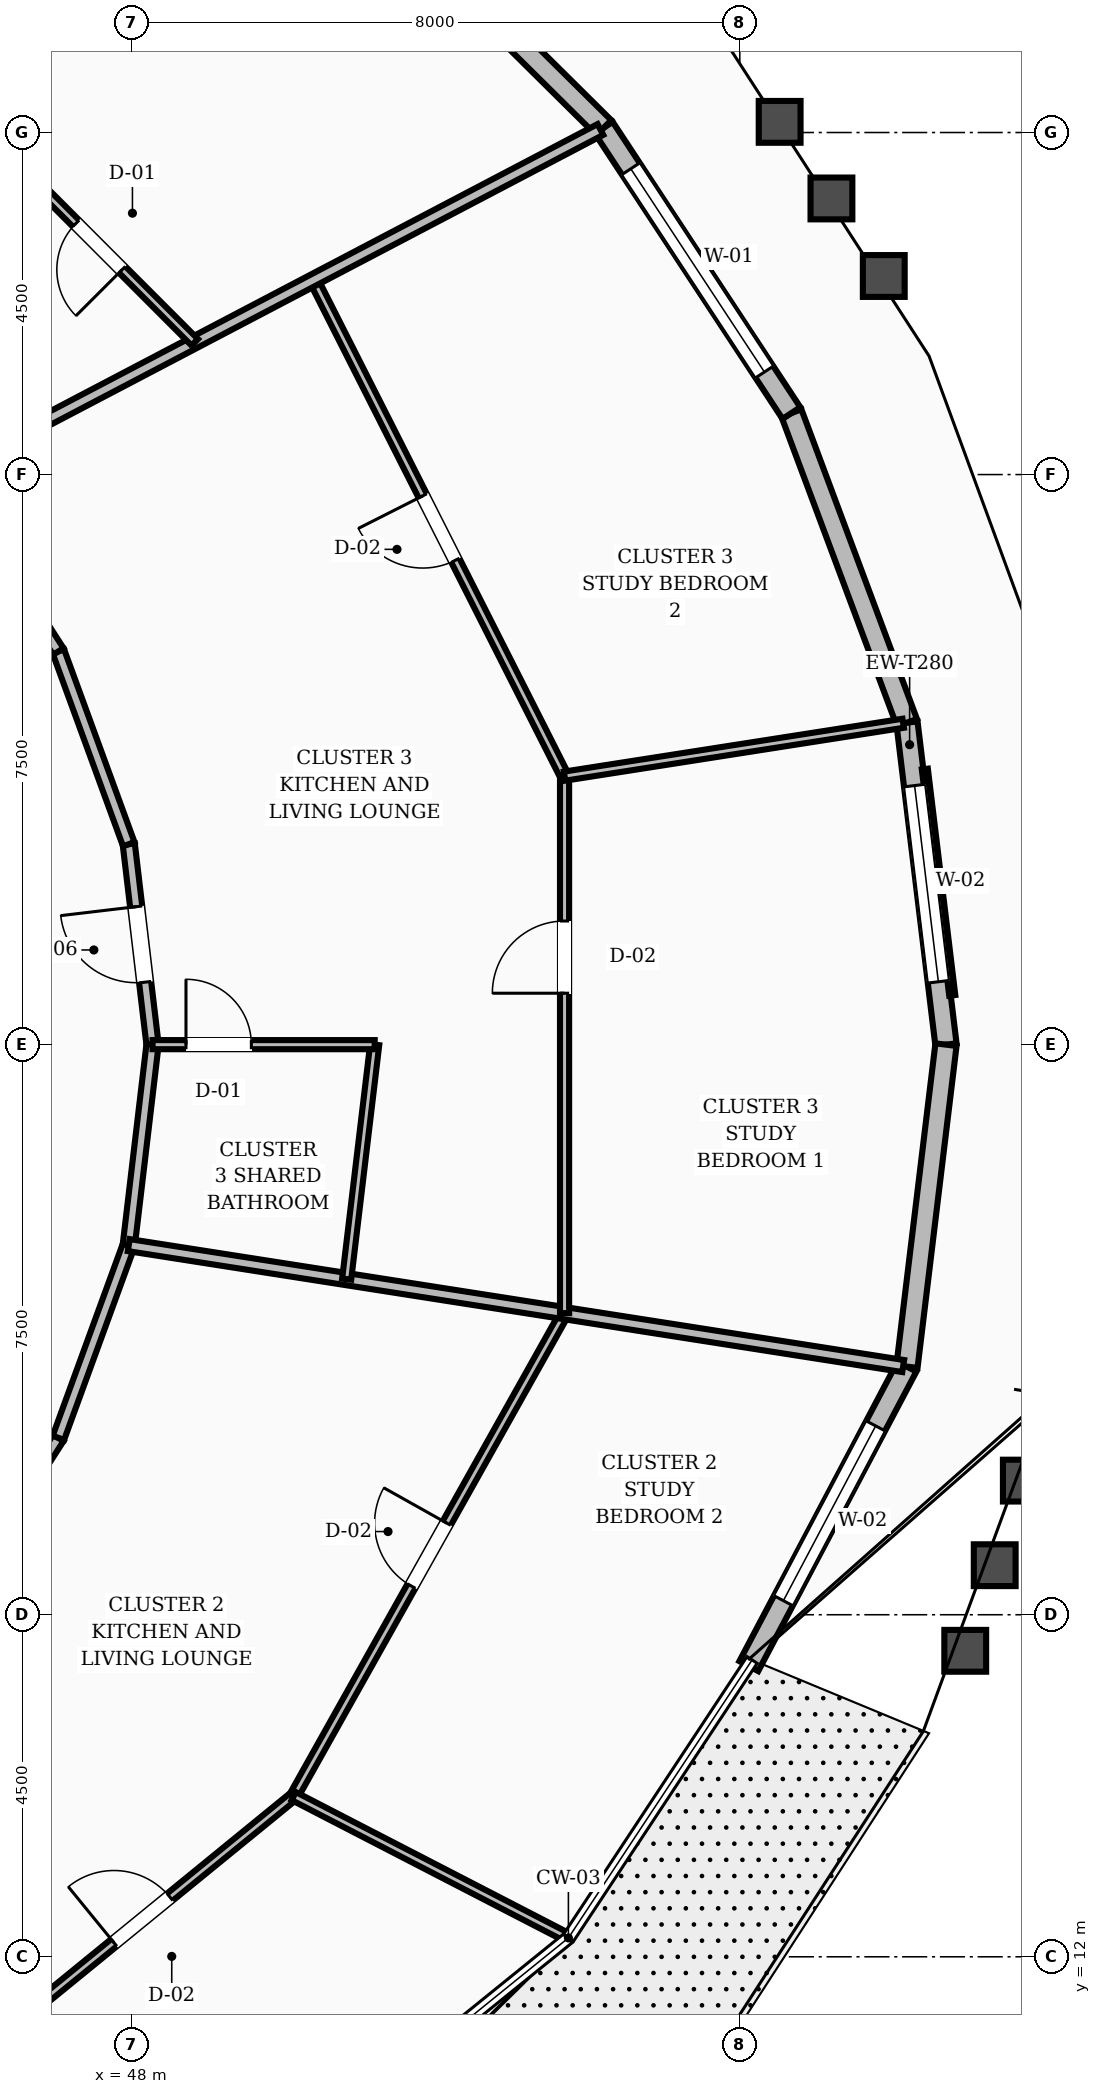
"""IFC4 building model, lengths in metres.
Left out: names, types, materials, properties, quantities, classifications, styles, units other than length and angle.
Written with IfcOpenShell. Run it as: python <this file> out.ifc"""

import sys

from ifc_helpers import new_model, si_unit, direction, frame, frame_2d, origin, place, context, subcontext, project, spatial, rectangle, extrude, element, fill, save


model = new_model("IFC4")
c1 = context("Model", 3, precision=1e-05, world=origin(), true_north=direction((0.0, 1.0)))
c2 = subcontext(c1, "Body", "Model", "MODEL_VIEW")
j1 = project(units=[si_unit("LENGTHUNIT", "METRE"), si_unit("PLANEANGLEUNIT", "RADIAN")], contexts=[c1])
p1 = place(None, origin())
s1 = spatial("IfcSite", under=j1, at=p1, CompositionType="ELEMENT")
p2 = place(p1, origin())
s2 = spatial("IfcBuilding", under=s1, at=p2, CompositionType="ELEMENT")
p3 = place(p2, frame((0.0, 0.0, 59.2)))
s3 = spatial("IfcBuildingStorey", under=s2, at=p3, CompositionType="ELEMENT", Elevation=59.2)
p4 = place(p3, frame((58.713, 24.0, 0.0), z_axis=(0.0, 0.0, 1.0), x_axis=(-0.120273268537, 0.992740822609, 0.0)))
e1 = element("IfcWall", 1, at=p4, inside=s3, PredefinedType="STANDARD", context=c2, shape_type="SweptSolid", body=[
    extrude(rectangle(XDim=4.267, YDim=0.28, at=frame_2d((2.133, 0.0))), origin(), (0.0, 0.0, 1.0), 2.65),
])
p5 = place(p4, frame((0.833, 0.0, 0.8)))
e2 = element("IfcOpeningElement", 2, at=p5, cuts=e1, PredefinedType="OPENING", context=c2, shape_type="SweptSolid", body=[
    extrude(rectangle(XDim=2.6, YDim=1.65, at=frame_2d((1.3, 0.825))), frame((0.0, 0.15, 0.0), z_axis=(0.0, -1.0, 0.0), x_axis=(1.0, 0.0, 0.0)), (0.0, 0.0, 1.0), 0.3),
])
p6 = place(p3, frame((58.199, 28.236, 0.0), z_axis=(0.0, 0.0, 1.0), x_axis=(-0.349670708584, 0.93687266774, 0.0)))
e3 = element("IfcWall", 3, at=p6, inside=s3, PredefinedType="STANDARD", context=c2, shape_type="SweptSolid", body=[
    extrude(rectangle(XDim=4.348, YDim=0.28, at=frame_2d((2.174, 0.0))), origin(), (0.0, 0.0, 1.0), 2.65),
])
p7 = place(p3, frame((56.679, 32.309, 0.0), z_axis=(0.0, 0.0, 1.0), x_axis=(-0.549434846356, 0.835536563898, 0.0)))
e4 = element("IfcWall", 4, at=p7, inside=s3, PredefinedType="STANDARD", context=c2, shape_type="SweptSolid", body=[
    extrude(rectangle(XDim=4.493, YDim=0.28, at=frame_2d((2.247, 0.0))), origin(), (0.0, 0.0, 1.0), 2.65),
])
p8 = place(p7, frame((0.646, 0.0, 0.8)))
e5 = element("IfcOpeningElement", 5, at=p8, cuts=e4, PredefinedType="OPENING", context=c2, shape_type="SweptSolid", body=[
    extrude(rectangle(XDim=3.2, YDim=1.65, at=frame_2d((1.6, 0.825))), frame((0.0, 0.15, 0.0), z_axis=(0.0, -1.0, 0.0), x_axis=(1.0, 0.0, 0.0)), (0.0, 0.0, 1.0), 0.3),
])
p9 = place(p3, frame((54.211, 36.063, 0.0), z_axis=(0.0, 0.0, 1.0), x_axis=(-0.710492625766, 0.70370464595, 0.0)))
e6 = element("IfcWall", 6, at=p9, inside=s3, PredefinedType="STANDARD", context=c2, shape_type="SweptSolid", body=[
    extrude(rectangle(XDim=4.676, YDim=0.28, at=frame_2d((2.338, 0.0))), origin(), (0.0, 0.0, 1.0), 2.65),
])
p10 = place(p3, frame((56.119, 15.824, 0.0), z_axis=(0.0, 0.0, 1.0), x_axis=(0.466915739223, 0.884301810733, 0.0)))
e7 = element("IfcWall", 7, at=p10, inside=s3, PredefinedType="STANDARD", context=c2, shape_type="SweptSolid", body=[
    extrude(rectangle(XDim=4.456, YDim=0.28, at=frame_2d((2.228, 0.0))), origin(), (0.0, 0.0, 1.0), 2.65),
])
p11 = place(p10, frame((0.974, 0.0, 0.8)))
e8 = element("IfcOpeningElement", 8, at=p11, cuts=e7, PredefinedType="OPENING", context=c2, shape_type="SweptSolid", body=[
    extrude(rectangle(XDim=2.6, YDim=1.65, at=frame_2d((1.3, 0.825))), frame((0.0, 0.15, 0.0), z_axis=(0.0, -1.0, 0.0), x_axis=(1.0, 0.0, 0.0)), (0.0, 0.0, 1.0), 0.3),
])
p12 = place(p3, frame((58.199, 19.764, 0.0), z_axis=(0.0, 0.0, 1.0), x_axis=(0.120273268537, 0.992740822609, 0.0)))
e9 = element("IfcWall", 9, at=p12, inside=s3, PredefinedType="STANDARD", context=c2, shape_type="SweptSolid", body=[
    extrude(rectangle(XDim=4.267, YDim=0.28, at=frame_2d((2.133, 0.0))), origin(), (0.0, 0.0, 1.0), 2.65),
])
p13 = place(p3, frame((48.274, 24.0, 0.0), z_axis=(0.0, 0.0, 1.0), x_axis=(-0.117763961213, 0.99304161516, 0.0)))
e10 = element("IfcWall", 10, at=p13, inside=s3, PredefinedType="SOLIDWALL", context=c2, shape_type="SweptSolid", body=[
    extrude(rectangle(XDim=2.656, YDim=0.16, at=frame_2d((1.328, 0.0))), origin(), (0.0, 0.0, 1.0), 2.61),
])
p14 = place(p13, frame((0.828, 0.0, 0.0)))
e11 = element("IfcOpeningElement", 11, at=p14, cuts=e10, PredefinedType="OPENING", context=c2, shape_type="SweptSolid", body=[
    extrude(rectangle(XDim=1.0, YDim=2.1, at=frame_2d((0.5, 1.05))), frame((0.0, 0.09, 0.0), z_axis=(0.0, -1.0, 0.0), x_axis=(1.0, 0.0, 0.0)), (0.0, 0.0, 1.0), 0.18),
])
p15 = place(p3, frame((47.961, 26.637, 0.0), z_axis=(0.0, 0.0, 1.0), x_axis=(-0.343013437329, 0.939330496583, 0.0)))
e12 = element("IfcWall", 12, at=p15, inside=s3, PredefinedType="SOLIDWALL", context=c2, shape_type="SweptSolid", body=[
    extrude(rectangle(XDim=2.7, YDim=0.16, at=frame_2d((1.35, 0.0))), origin(), (0.0, 0.0, 1.0), 2.61),
])
for number, where, z_axis, x_axis in (
    (13, (47.035, 29.173, 0.0), (0.0, 0.0, 1.0), (-0.541, 0.841, 0.0)),
    (14, (45.531, 16.49, 0.0), (0.0, 0.0, 1.0), (0.541, 0.841, 0.0)),
):
    element("IfcWall", number, at=place(p3, frame(where, z_axis=z_axis, x_axis=x_axis)), inside=s3, PredefinedType="SOLIDWALL", context=c2, shape_type="SweptSolid", body=[
        extrude(rectangle(XDim=2.779, YDim=0.16, at=frame_2d((1.39, 0.0))), origin(), (0.0, 0.0, 1.0), 2.61),
    ])
p16 = place(p3, frame((47.035, 18.827, 0.0), z_axis=(0.0, 0.0, 1.0), x_axis=(0.343013437329, 0.939330496583, 0.0)))
e15 = element("IfcWall", 15, at=p16, inside=s3, PredefinedType="SOLIDWALL", context=c2, shape_type="SweptSolid", body=[
    extrude(rectangle(XDim=2.7, YDim=0.16, at=frame_2d((1.35, 0.0))), origin(), (0.0, 0.0, 1.0), 2.61),
])
p17 = place(p3, frame((47.961, 21.363, 0.0), z_axis=(0.0, 0.0, 1.0), x_axis=(0.117763961213, 0.99304161516, 0.0)))
e16 = element("IfcWall", 16, at=p17, inside=s3, PredefinedType="SOLIDWALL", context=c2, shape_type="SweptSolid", body=[
    extrude(rectangle(XDim=2.656, YDim=0.16, at=frame_2d((1.328, 0.0))), origin(), (0.0, 0.0, 1.0), 2.61),
])
p18 = place(p3, frame((44.115, 9.205, 0.0), z_axis=(0.0, 0.0, 1.0), x_axis=(0.774795715617, 0.632211672671, 0.0)))
e17 = element("IfcWall", 17, at=p18, inside=s3, PredefinedType="PARTITIONING", context=c2, shape_type="SweptSolid", body=[
    extrude(rectangle(XDim=7.765, YDim=0.12, at=frame_2d((3.883, 0.0))), origin(), (0.0, 0.0, 1.0), 2.61),
])
p19 = place(p18, frame((4.713, 0.0, 0.0)))
e18 = element("IfcOpeningElement", 18, at=p19, cuts=e17, PredefinedType="OPENING", context=c2, shape_type="SweptSolid", body=[
    extrude(rectangle(XDim=0.95, YDim=2.1, at=frame_2d((0.475, 1.05))), frame((0.0, 0.07, 0.0), z_axis=(0.0, -1.0, 0.0), x_axis=(1.0, 0.0, 0.0)), (0.0, 0.0, 1.0), 0.14),
])
p20 = place(p3, frame((50.131, 14.115, 0.0), z_axis=(0.0, 0.0, 1.0), x_axis=(0.489207447667, 0.872167457056, 0.0)))
e19 = element("IfcWall", 19, at=p20, inside=s3, PredefinedType="PARTITIONING", context=c2, shape_type="SweptSolid", body=[
    extrude(rectangle(XDim=7.284, YDim=0.12, at=frame_2d((3.642, 0.0))), origin(), (0.0, 0.0, 1.0), 2.61),
])
p21 = place(p20, frame((3.167, 0.0, 0.0)))
e20 = element("IfcOpeningElement", 20, at=p21, cuts=e19, PredefinedType="OPENING", context=c2, shape_type="SweptSolid", body=[
    extrude(rectangle(XDim=0.95, YDim=2.1, at=frame_2d((0.475, 1.05))), frame((0.0, 0.07, 0.0), z_axis=(0.0, -1.0, 0.0), x_axis=(1.0, 0.0, 0.0)), (0.0, 0.0, 1.0), 0.14),
])
p22 = place(p3, frame((50.131, 14.115, 0.0), z_axis=(0.0, 0.0, 1.0), x_axis=(0.88850478296, -0.458867356277, 0.0)))
e21 = element("IfcWall", 21, at=p22, inside=s3, PredefinedType="PARTITIONING", context=c2, shape_type="SweptSolid", body=[
    extrude(rectangle(XDim=4.018, YDim=0.12, at=frame_2d((2.009, 0.0))), origin(), (0.0, 0.0, 1.0), 2.61),
])
p23 = place(p3, frame((47.961, 21.363, 0.0), z_axis=(0.0, 0.0, 1.0), x_axis=(0.988025684157, -0.154289492336, 0.0)))
e22 = element("IfcWall", 22, at=p23, inside=s3, PredefinedType="SOLIDWALL", context=c2, shape_type="SweptSolid", body=[
    extrude(rectangle(XDim=10.312, YDim=0.16, at=frame_2d((5.156, 0.0))), origin(), (0.0, 0.0, 1.0), 2.61),
])
p24 = place(p3, frame((50.828, 20.915, 0.0), z_axis=(0.0, 0.0, 1.0), x_axis=(0.118742368253, 0.992925097871, 0.0)))
e23 = element("IfcWall", 23, at=p24, inside=s3, PredefinedType="PARTITIONING", context=c2, shape_type="SweptSolid", body=[
    extrude(rectangle(XDim=3.107, YDim=0.12, at=frame_2d((1.553, 0.0))), origin(), (0.0, 0.0, 1.0), 2.61),
])
p25 = place(p3, frame((48.274, 24.0, 0.0), z_axis=(0.0, 0.0, 1.0), x_axis=(1.0, 0.0, 0.0)))
e24 = element("IfcWall", 24, at=p25, inside=s3, PredefinedType="PARTITIONING", context=c2, shape_type="SweptSolid", body=[
    extrude(rectangle(XDim=2.923, YDim=0.12, at=frame_2d((1.461, 0.0))), origin(), (0.0, 0.0, 1.0), 2.61),
])
p26 = place(p25, frame((0.44, 0.0, 0.0)))
e25 = element("IfcOpeningElement", 25, at=p26, cuts=e24, PredefinedType="OPENING", context=c2, shape_type="SweptSolid", body=[
    extrude(rectangle(XDim=0.86, YDim=2.1, at=frame_2d((0.43, 1.05))), frame((0.0, 0.07, 0.0), z_axis=(0.0, -1.0, 0.0), x_axis=(1.0, 0.0, 0.0)), (0.0, 0.0, 1.0), 0.14),
])
p27 = place(p3, frame((53.695, 20.468, 0.0), z_axis=(0.0, 0.0, 1.0), x_axis=(0.0, 1.0, 0.0)))
e26 = element("IfcWall", 26, at=p27, inside=s3, PredefinedType="PARTITIONING", context=c2, shape_type="SweptSolid", body=[
    extrude(rectangle(XDim=7.065, YDim=0.12, at=frame_2d((3.532, 0.0))), origin(), (0.0, 0.0, 1.0), 2.61),
])
p28 = place(p27, frame((4.209, 0.0, 0.0)))
e27 = element("IfcOpeningElement", 27, at=p28, cuts=e26, PredefinedType="OPENING", context=c2, shape_type="SweptSolid", body=[
    extrude(rectangle(XDim=0.95, YDim=2.1, at=frame_2d((0.475, 1.05))), frame((0.0, 0.07, 0.0), z_axis=(0.0, -1.0, 0.0), x_axis=(1.0, 0.0, 0.0)), (0.0, 0.0, 1.0), 0.14),
])
p29 = place(p3, frame((53.695, 27.532, 0.0), z_axis=(0.0, 0.0, 1.0), x_axis=(-0.45148033716, 0.892281068474, 0.0)))
e28 = element("IfcWall", 28, at=p29, inside=s3, PredefinedType="PARTITIONING", context=c2, shape_type="SweptSolid", body=[
    extrude(rectangle(XDim=7.315, YDim=0.12, at=frame_2d((3.658, 0.0))), origin(), (0.0, 0.0, 1.0), 2.61),
])
p30 = place(p29, frame((3.183, 0.0, 0.0)))
e29 = element("IfcOpeningElement", 29, at=p30, cuts=e28, PredefinedType="OPENING", context=c2, shape_type="SweptSolid", body=[
    extrude(rectangle(XDim=0.95, YDim=2.1, at=frame_2d((0.475, 1.05))), frame((0.0, 0.07, 0.0), z_axis=(0.0, -1.0, 0.0), x_axis=(1.0, 0.0, 0.0)), (0.0, 0.0, 1.0), 0.14),
])
p31 = place(p3, frame((53.695, 27.532, 0.0), z_axis=(0.0, 0.0, 1.0), x_axis=(0.988023643712, 0.154302558199, 0.0)))
e30 = element("IfcWall", 30, at=p31, inside=s3, PredefinedType="PARTITIONING", context=c2, shape_type="SweptSolid", body=[
    extrude(rectangle(XDim=4.509, YDim=0.12, at=frame_2d((2.255, 0.0))), origin(), (0.0, 0.0, 1.0), 2.61),
])
p32 = place(p3, frame((45.531, 31.51, 0.0), z_axis=(0.0, 0.0, 1.0), x_axis=(0.885565291544, 0.464514923778, 0.0)))
e31 = element("IfcWall", 31, at=p32, inside=s3, PredefinedType="SOLIDWALL", context=c2, shape_type="SweptSolid", body=[
    extrude(rectangle(XDim=9.751, YDim=0.16, at=frame_2d((4.875, 0.0))), origin(), (0.0, 0.0, 1.0), 2.61),
])
p33 = place(p3, frame((48.83, 33.24, 0.0), z_axis=(0.0, 0.0, 1.0), x_axis=(-0.706661122184, 0.707552159486, 0.0)))
e32 = element("IfcWall", 32, at=p33, inside=s3, PredefinedType="PARTITIONING", context=c2, shape_type="SweptSolid", body=[
    extrude(rectangle(XDim=3.562, YDim=0.12, at=frame_2d((1.781, 0.0))), origin(), (0.0, 0.0, 1.0), 2.61),
])
p34 = place(p33, frame((1.351, 0.0, 0.0)))
e33 = element("IfcOpeningElement", 33, at=p34, cuts=e32, PredefinedType="OPENING", context=c2, shape_type="SweptSolid", body=[
    extrude(rectangle(XDim=0.86, YDim=2.1, at=frame_2d((0.43, 1.05))), frame((0.0, 0.07, 0.0), z_axis=(0.0, -1.0, 0.0), x_axis=(1.0, 0.0, 0.0)), (0.0, 0.0, 1.0), 0.14),
])
p35 = place(p5, origin())
e34 = element("IfcWindow", 34, at=p35, inside=s3, PartitioningType="SINGLE_PANEL", PredefinedType="WINDOW", context=c2, shape_type="SweptSolid", body=[
    extrude(rectangle(XDim=2.6, YDim=1.65, at=frame_2d((1.3, 0.825))), frame((0.0, 0.03, 0.0), z_axis=(0.0, -1.0, 0.0), x_axis=(1.0, 0.0, 0.0)), (0.0, 0.0, 1.0), 0.06),
])
fill(e2, e34)
p36 = place(p8, origin())
e35 = element("IfcWindow", 35, at=p36, inside=s3, PartitioningType="SINGLE_PANEL", PredefinedType="WINDOW", context=c2, shape_type="SweptSolid", body=[
    extrude(rectangle(XDim=3.2, YDim=1.65, at=frame_2d((1.6, 0.825))), frame((0.0, 0.03, 0.0), z_axis=(0.0, -1.0, 0.0), x_axis=(1.0, 0.0, 0.0)), (0.0, 0.0, 1.0), 0.06),
])
fill(e5, e35)
p37 = place(p11, origin())
e36 = element("IfcWindow", 36, at=p37, inside=s3, PartitioningType="SINGLE_PANEL", PredefinedType="WINDOW", context=c2, shape_type="SweptSolid", body=[
    extrude(rectangle(XDim=2.6, YDim=1.65, at=frame_2d((1.3, 0.825))), frame((0.0, 0.03, 0.0), z_axis=(0.0, -1.0, 0.0), x_axis=(1.0, 0.0, 0.0)), (0.0, 0.0, 1.0), 0.06),
])
fill(e8, e36)
p38 = place(p19, origin())
e37 = element("IfcDoor", 37, at=p38, inside=s3, OperationType="SINGLE_SWING_LEFT", PredefinedType="DOOR", context=c2, shape_type="SweptSolid", body=[
    extrude(rectangle(XDim=0.95, YDim=2.1, at=frame_2d((0.475, 1.05))), frame((0.0, 0.025, 0.0), z_axis=(0.0, -1.0, 0.0), x_axis=(1.0, 0.0, 0.0)), (0.0, 0.0, 1.0), 0.05),
])
fill(e18, e37)
p39 = place(p21, origin())
e38 = element("IfcDoor", 38, at=p39, inside=s3, OperationType="SINGLE_SWING_RIGHT", PredefinedType="DOOR", context=c2, shape_type="SweptSolid", body=[
    extrude(rectangle(XDim=0.95, YDim=2.1, at=frame_2d((0.475, 1.05))), frame((0.0, 0.025, 0.0), z_axis=(0.0, -1.0, 0.0), x_axis=(1.0, 0.0, 0.0)), (0.0, 0.0, 1.0), 0.05),
])
fill(e20, e38)
p40 = place(p26, origin())
e39 = element("IfcDoor", 39, at=p40, inside=s3, OperationType="SINGLE_SWING_LEFT", PredefinedType="DOOR", context=c2, shape_type="SweptSolid", body=[
    extrude(rectangle(XDim=0.86, YDim=2.1, at=frame_2d((0.43, 1.05))), frame((0.0, 0.025, 0.0), z_axis=(0.0, -1.0, 0.0), x_axis=(1.0, 0.0, 0.0)), (0.0, 0.0, 1.0), 0.05),
])
fill(e25, e39)
p41 = place(p14, origin())
e40 = element("IfcDoor", 40, at=p41, inside=s3, OperationType="SINGLE_SWING_RIGHT", PredefinedType="DOOR", context=c2, shape_type="SweptSolid", body=[
    extrude(rectangle(XDim=1.0, YDim=2.1, at=frame_2d((0.5, 1.05))), frame((0.0, 0.025, 0.0), z_axis=(0.0, -1.0, 0.0), x_axis=(1.0, 0.0, 0.0)), (0.0, 0.0, 1.0), 0.05),
])
fill(e11, e40)
p42 = place(p28, origin())
e41 = element("IfcDoor", 41, at=p42, inside=s3, OperationType="SINGLE_SWING_LEFT", PredefinedType="DOOR", context=c2, shape_type="SweptSolid", body=[
    extrude(rectangle(XDim=0.95, YDim=2.1, at=frame_2d((0.475, 1.05))), frame((0.0, 0.025, 0.0), z_axis=(0.0, -1.0, 0.0), x_axis=(1.0, 0.0, 0.0)), (0.0, 0.0, 1.0), 0.05),
])
fill(e27, e41)
p43 = place(p30, origin())
e42 = element("IfcDoor", 42, at=p43, inside=s3, OperationType="SINGLE_SWING_RIGHT", PredefinedType="DOOR", context=c2, shape_type="SweptSolid", body=[
    extrude(rectangle(XDim=0.95, YDim=2.1, at=frame_2d((0.475, 1.05))), frame((0.0, 0.025, 0.0), z_axis=(0.0, -1.0, 0.0), x_axis=(1.0, 0.0, 0.0)), (0.0, 0.0, 1.0), 0.05),
])
fill(e29, e42)
p44 = place(p34, origin())
e43 = element("IfcDoor", 43, at=p44, inside=s3, OperationType="SINGLE_SWING_LEFT", PredefinedType="DOOR", context=c2, shape_type="SweptSolid", body=[
    extrude(rectangle(XDim=0.86, YDim=2.1, at=frame_2d((0.43, 1.05))), frame((0.0, 0.025, 0.0), z_axis=(0.0, -1.0, 0.0), x_axis=(1.0, 0.0, 0.0)), (0.0, 0.0, 1.0), 0.05),
])
fill(e33, e43)
save(model, sys.argv[1])
